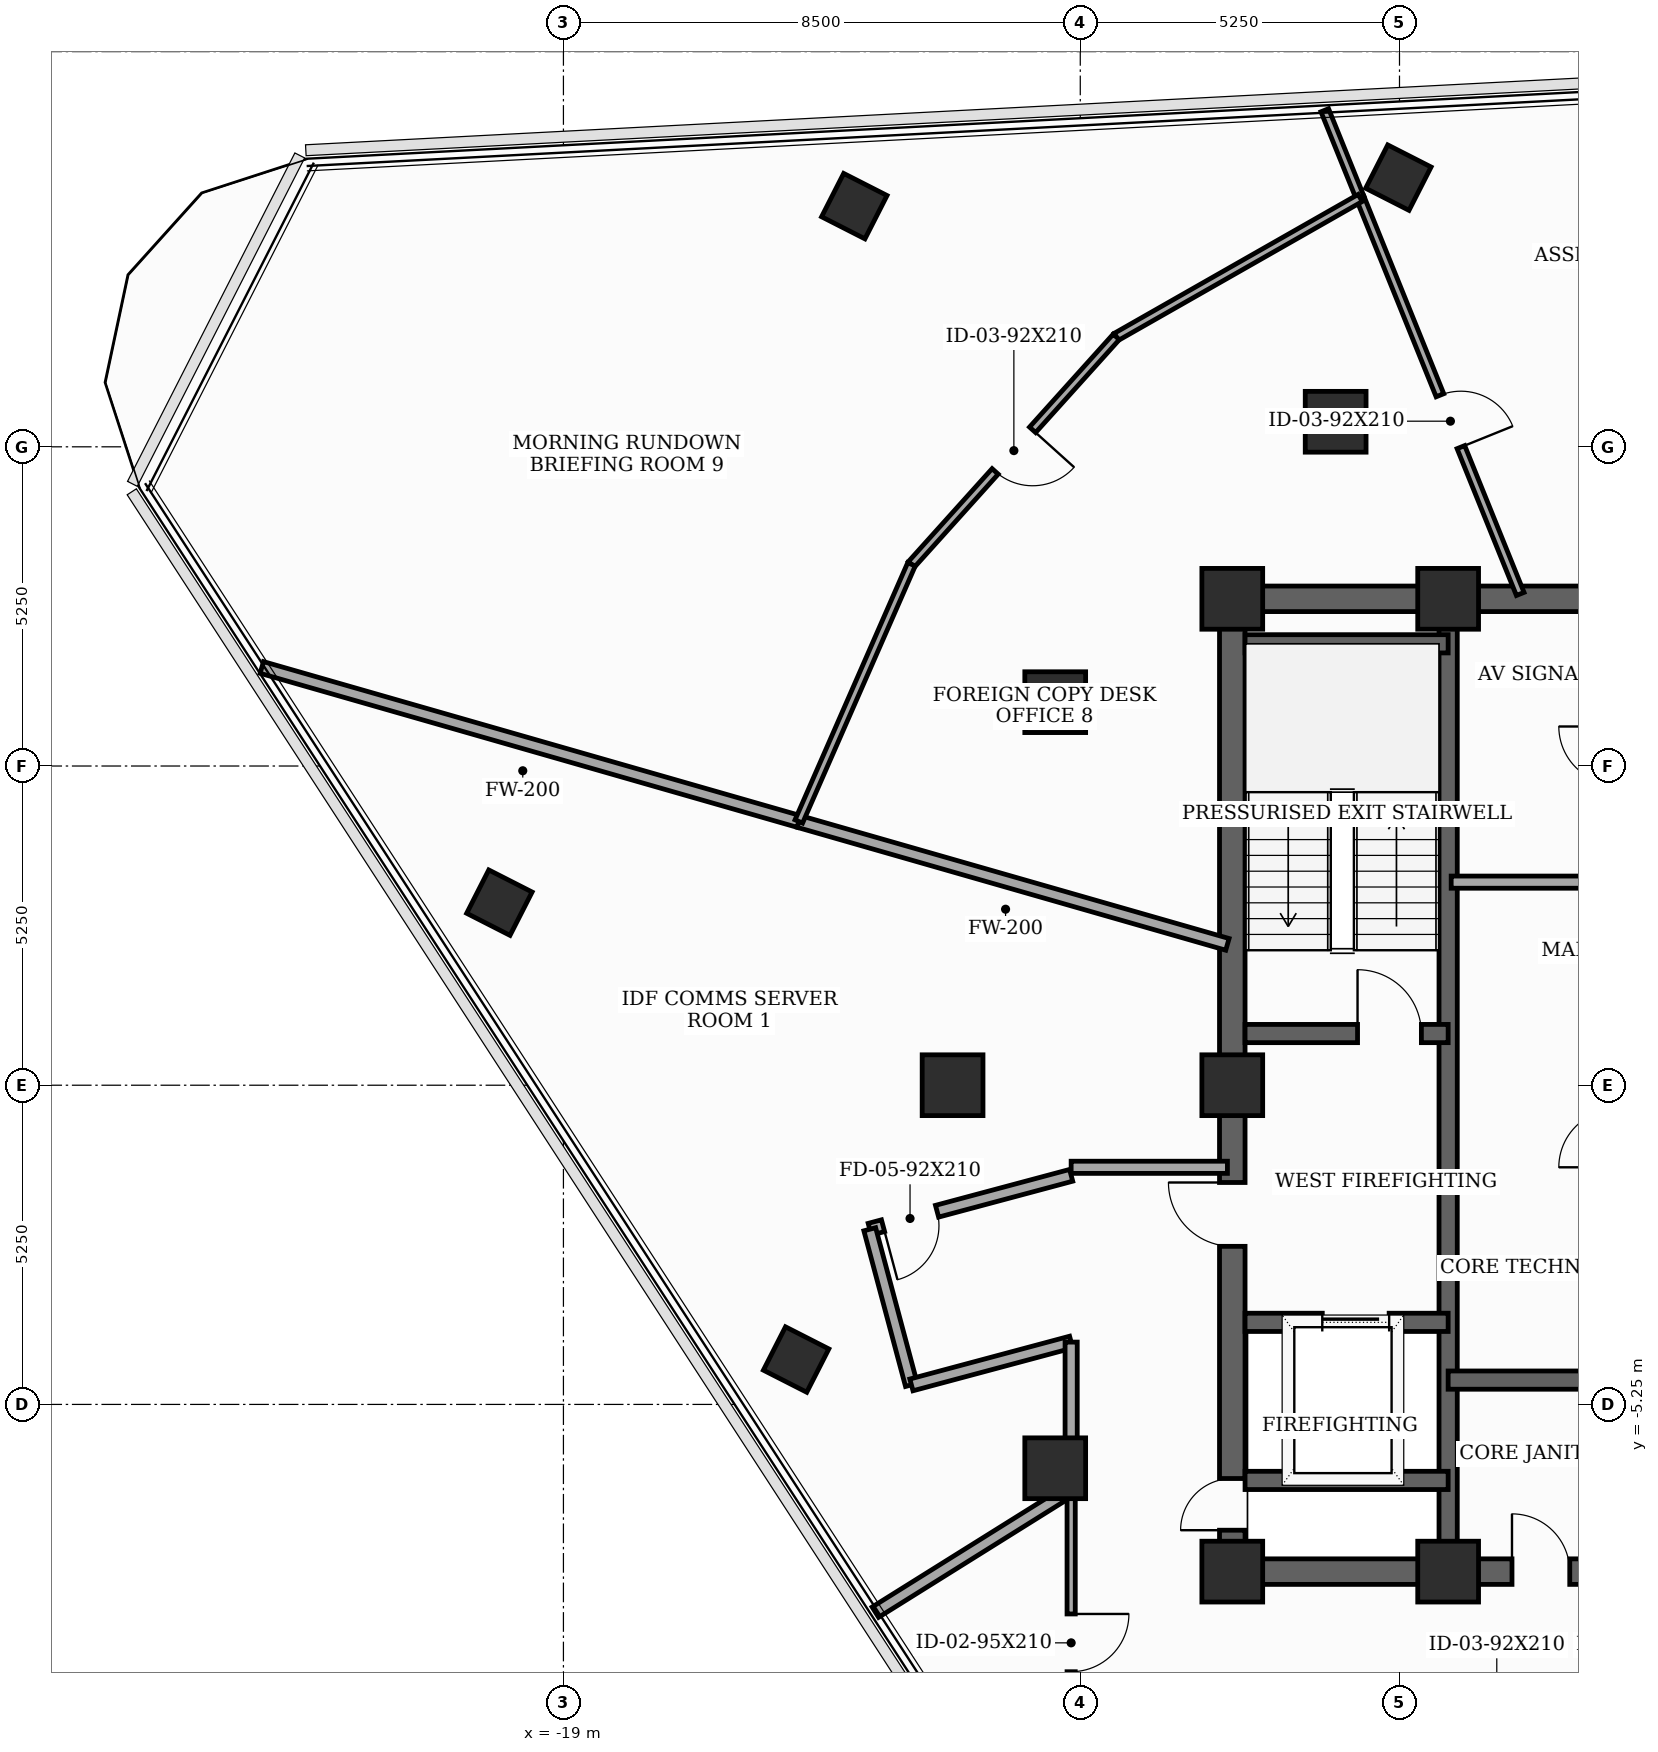
"""IFC4 building model, lengths in metres.
Left out: names, types, materials, properties, quantities, classifications, styles, units other than length and angle.
Written with IfcOpenShell. Run it as: python <this file> out.ifc"""

import sys

from ifc_helpers import new_model, si_unit, direction, frame, frame_2d, origin, origin_2d, place, context, subcontext, project, spatial, rectangle, extrude, element, fill, save


model = new_model("IFC4")
c1 = context("Model", 3, precision=1e-05, world=origin(), true_north=direction((0.0, 1.0)))
c2 = subcontext(c1, "Body", "Model", "MODEL_VIEW")
j1 = project(units=[si_unit("LENGTHUNIT", "METRE"), si_unit("PLANEANGLEUNIT", "RADIAN")], contexts=[c1])
p1 = place(None, origin())
s1 = spatial("IfcSite", under=j1, at=p1, CompositionType="ELEMENT")
p2 = place(p1, origin())
s2 = spatial("IfcBuilding", under=s1, at=p2, CompositionType="ELEMENT")
p3 = place(p2, frame((0.0, 0.0, 263.3)))
s3 = spatial("IfcBuildingStorey", under=s2, at=p3, CompositionType="ELEMENT", Elevation=263.3)
for number, where, z_axis, x_axis in (
    (1, (-8.0, -8.0, 0.0), (0.0, 0.0, 1.0), (1.0, 0.0, 0.0)),
    (2, (-4.45, -8.0, 0.0), (0.0, 0.0, 1.0), (1.0, 0.0, 0.0)),
    (3, (-4.45, 8.0, 0.0), (0.0, 0.0, 1.0), (1.0, 0.0, 0.0)),
    (4, (-8.0, 8.0, 0.0), (0.0, 0.0, 1.0), (1.0, 0.0, 0.0)),
    (5, (-8.0, 0.0, 0.0), (0.0, 0.0, 1.0), (1.0, 0.0, 0.0)),
    (6, (-6.3, 10.912, 0.0), (0.0, 0.0, 1.0), (1.0, 0.0, 0.0)),
    (7, (-10.912, 6.3, 0.0), (0.0, 0.0, 1.0), (1.0, 0.0, 0.0)),
    (8, (-12.6, 0.0, 0.0), (0.0, 0.0, 1.0), (1.0, 0.0, 0.0)),
    (9, (-10.912, -6.3, 0.0), (0.0, 0.0, 1.0), (1.0, 0.0, 0.0)),
):
    element("IfcColumn", number, at=place(p3, frame(where, z_axis=z_axis, x_axis=x_axis)), inside=s3, PredefinedType="COLUMN", context=c2, shape_type="SweptSolid", body=[
        extrude(rectangle(XDim=1.0, YDim=1.0, at=origin_2d()), origin(), (0.0, 0.0, 1.0), 3.7),
    ])
for number, where, z_axis, x_axis in (
    (10, (-5.269, 14.927, 0.0), (0.0, 0.0, 1.0), (0.454, 0.891, 0.0)),
    (11, (-14.216, 14.458, 0.0), (0.0, 0.0, 1.0), (0.454, 0.891, 0.0)),
    (12, (-20.053, 3.003, 0.0), (0.0, 0.0, 1.0), (0.454, 0.891, 0.0)),
    (13, (-15.173, -4.512, 0.0), (0.0, 0.0, 1.0), (0.454, 0.891, 0.0)),
):
    element("IfcColumn", number, at=place(p3, frame(where, z_axis=z_axis, x_axis=x_axis)), inside=s3, PredefinedType="COLUMN", context=c2, shape_type="SweptSolid", body=[
        extrude(rectangle(XDim=0.8, YDim=0.8, at=origin_2d()), origin(), (0.0, 0.0, 1.0), 3.7),
    ])
p4 = place(p3, frame((-8.0, -8.0, 0.0), z_axis=(0.0, 0.0, 1.0), x_axis=(0.0, 1.0, 0.0)))
e14 = element("IfcWall", 14, at=p4, inside=s3, PredefinedType="SHEAR", context=c2, shape_type="SweptSolid", body=[
    extrude(rectangle(XDim=16.0, YDim=0.42, at=frame_2d((8.0, 0.0))), origin(), (0.0, 0.0, 1.0), 3.5),
])
p5 = place(p4, frame((0.681, 0.0, 0.0)))
e15 = element("IfcOpeningElement", 15, at=p5, cuts=e14, PredefinedType="OPENING", context=c2, shape_type="SweptSolid", body=[
    extrude(rectangle(XDim=0.85, YDim=2.02, at=frame_2d((0.425, 1.01))), frame((0.0, 0.22, 0.0), z_axis=(0.0, -1.0, 0.0), x_axis=(1.0, 0.0, 0.0)), (0.0, 0.0, 1.0), 0.44),
])
p6 = place(p4, frame((5.35, 0.0, 0.0)))
e16 = element("IfcOpeningElement", 16, at=p6, cuts=e14, PredefinedType="OPENING", context=c2, shape_type="SweptSolid", body=[
    extrude(rectangle(XDim=1.05, YDim=2.15, at=frame_2d((0.525, 1.075))), frame((0.0, 0.22, 0.0), z_axis=(0.0, -1.0, 0.0), x_axis=(1.0, 0.0, 0.0)), (0.0, 0.0, 1.0), 0.44),
])
p7 = place(p3, frame((-8.0, -8.0, 0.0), z_axis=(0.0, 0.0, 1.0), x_axis=(1.0, 0.0, 0.0)))
e17 = element("IfcWall", 17, at=p7, inside=s3, PredefinedType="SHEAR", context=c2, shape_type="SweptSolid", body=[
    extrude(rectangle(XDim=16.0, YDim=0.42, at=frame_2d((8.0, 0.0))), origin(), (0.0, 0.0, 1.0), 3.5),
])
p8 = place(p7, frame((4.6, 0.0, 0.0)))
e18 = element("IfcOpeningElement", 18, at=p8, cuts=e17, PredefinedType="OPENING", context=c2, shape_type="SweptSolid", body=[
    extrude(rectangle(XDim=0.95, YDim=2.1, at=frame_2d((0.475, 1.05))), frame((0.0, 0.22, 0.0), z_axis=(0.0, -1.0, 0.0), x_axis=(1.0, 0.0, 0.0)), (0.0, 0.0, 1.0), 0.44),
])
p9 = place(p7, frame((7.52, 0.0, 0.0)))
e19 = element("IfcOpeningElement", 19, at=p9, cuts=e17, PredefinedType="OPENING", context=c2, shape_type="SweptSolid", body=[
    extrude(rectangle(XDim=0.95, YDim=2.1, at=frame_2d((0.475, 1.05))), frame((0.0, 0.22, 0.0), z_axis=(0.0, -1.0, 0.0), x_axis=(1.0, 0.0, 0.0)), (0.0, 0.0, 1.0), 0.44),
])
p10 = place(p7, frame((10.45, 0.0, 0.0)))
e20 = element("IfcOpeningElement", 20, at=p10, cuts=e17, PredefinedType="OPENING", context=c2, shape_type="SweptSolid", body=[
    extrude(rectangle(XDim=0.95, YDim=2.1, at=frame_2d((0.475, 1.05))), frame((0.0, 0.22, 0.0), z_axis=(0.0, -1.0, 0.0), x_axis=(1.0, 0.0, 0.0)), (0.0, 0.0, 1.0), 0.44),
])
p11 = place(p3, frame((-8.0, 8.0, 0.0), z_axis=(0.0, 0.0, 1.0), x_axis=(1.0, 0.0, 0.0)))
e21 = element("IfcWall", 21, at=p11, inside=s3, PredefinedType="SHEAR", context=c2, shape_type="SweptSolid", body=[
    extrude(rectangle(XDim=16.0, YDim=0.42, at=frame_2d((8.0, 0.0))), origin(), (0.0, 0.0, 1.0), 3.5),
])
p12 = place(p11, frame((7.1, 0.0, 0.0)))
e22 = element("IfcOpeningElement", 22, at=p12, cuts=e21, PredefinedType="OPENING", context=c2, shape_type="SweptSolid", body=[
    extrude(rectangle(XDim=1.8, YDim=2.15, at=frame_2d((0.9, 1.075))), frame((0.0, 0.22, 0.0), z_axis=(0.0, -1.0, 0.0), x_axis=(1.0, 0.0, 0.0)), (0.0, 0.0, 1.0), 0.44),
])
p13 = place(p3, frame((-4.45, -7.79, 0.0), z_axis=(0.0, 0.0, 1.0), x_axis=(0.0, 1.0, 0.0)))
e23 = element("IfcWall", 23, at=p13, inside=s3, PredefinedType="SHEAR", context=c2, shape_type="SweptSolid", body=[
    extrude(rectangle(XDim=15.58, YDim=0.3, at=frame_2d((7.79, 0.0))), origin(), (0.0, 0.0, 1.0), 3.5),
])
p14 = place(p3, frame((-7.79, 0.85, 0.0), z_axis=(0.0, 0.0, 1.0), x_axis=(1.0, 0.0, 0.0)))
e24 = element("IfcWall", 24, at=p14, inside=s3, PredefinedType="SHEAR", context=c2, shape_type="SweptSolid", body=[
    extrude(rectangle(XDim=3.34, YDim=0.3, at=frame_2d((1.67, 0.0))), origin(), (0.0, 0.0, 1.0), 3.5),
])
p15 = place(p14, frame((1.85, 0.0, 0.0)))
e25 = element("IfcOpeningElement", 25, at=p15, cuts=e24, PredefinedType="OPENING", context=c2, shape_type="SweptSolid", body=[
    extrude(rectangle(XDim=1.05, YDim=2.15, at=frame_2d((0.525, 1.075))), frame((0.0, 0.16, 0.0), z_axis=(0.0, -1.0, 0.0), x_axis=(1.0, 0.0, 0.0)), (0.0, 0.0, 1.0), 0.32),
])
p16 = place(p3, frame((-7.79, 7.26, 0.0), z_axis=(0.0, 0.0, 1.0), x_axis=(1.0, 0.0, 0.0)))
e26 = element("IfcWall", 26, at=p16, inside=s3, PredefinedType="SHEAR", context=c2, shape_type="SweptSolid", body=[
    extrude(rectangle(XDim=3.34, YDim=0.3, at=frame_2d((1.67, 0.0))), origin(), (0.0, 0.0, 1.0), 3.5),
])
p17 = place(p3, frame((-7.79, -3.9, 0.0), z_axis=(0.0, 0.0, 1.0), x_axis=(1.0, 0.0, 0.0)))
e27 = element("IfcWall", 27, at=p17, inside=s3, PredefinedType="SHEAR", context=c2, shape_type="SweptSolid", body=[
    extrude(rectangle(XDim=3.34, YDim=0.3, at=frame_2d((1.67, 0.0))), origin(), (0.0, 0.0, 1.0), 3.5),
])
p18 = place(p17, frame((1.27, 0.0, 0.0)))
e28 = element("IfcOpeningElement", 28, at=p18, cuts=e27, PredefinedType="OPENING", context=c2, shape_type="SweptSolid", body=[
    extrude(rectangle(XDim=1.1, YDim=2.1, at=frame_2d((0.55, 1.05))), frame((0.0, 0.16, 0.0), z_axis=(0.0, -1.0, 0.0), x_axis=(1.0, 0.0, 0.0)), (0.0, 0.0, 1.0), 0.32),
])
p19 = place(p3, frame((-7.79, -6.5, 0.0), z_axis=(0.0, 0.0, 1.0), x_axis=(1.0, 0.0, 0.0)))
e29 = element("IfcWall", 29, at=p19, inside=s3, PredefinedType="SHEAR", context=c2, shape_type="SweptSolid", body=[
    extrude(rectangle(XDim=3.34, YDim=0.3, at=frame_2d((1.67, 0.0))), origin(), (0.0, 0.0, 1.0), 3.5),
])
p20 = place(p3, frame((-4.45, -4.85, 0.0), z_axis=(0.0, 0.0, 1.0), x_axis=(1.0, 0.0, 0.0)))
e30 = element("IfcWall", 30, at=p20, inside=s3, PredefinedType="SHEAR", context=c2, shape_type="SweptSolid", body=[
    extrude(rectangle(XDim=8.9, YDim=0.3, at=frame_2d((4.45, 0.0))), origin(), (0.0, 0.0, 1.0), 3.5),
])
p21 = place(p3, frame((-4.4, 3.34, 0.0), z_axis=(0.0, 0.0, 1.0), x_axis=(1.0, 0.0, 0.0)))
e31 = element("IfcWall", 31, at=p21, inside=s3, PredefinedType="SOLIDWALL", context=c2, shape_type="SweptSolid", body=[
    extrude(rectangle(XDim=2.68, YDim=0.2, at=frame_2d((1.34, 0.0))), origin(), (0.0, 0.0, 1.0), 3.5),
])
p22 = place(p3, frame((-8.08, -1.35, 0.0), z_axis=(0.0, 0.0, 1.0), x_axis=(-1.0, 0.0, 0.0)))
e32 = element("IfcWall", 32, at=p22, inside=s3, PredefinedType="SOLIDWALL", context=c2, shape_type="SweptSolid", body=[
    extrude(rectangle(XDim=2.57, YDim=0.2, at=frame_2d((1.285, 0.0))), origin(), (0.0, 0.0, 1.0), 2.885),
])
p23 = place(p3, frame((-10.65, -1.482, 0.0), z_axis=(0.0, 0.0, 1.0), x_axis=(-0.965961397105, -0.2586862565, 0.0)))
e33 = element("IfcWall", 33, at=p23, inside=s3, PredefinedType="SOLIDWALL", context=c2, shape_type="SweptSolid", body=[
    extrude(rectangle(XDim=3.429, YDim=0.2, at=frame_2d((1.714, 0.0))), origin(), (0.0, 0.0, 1.0), 2.885),
])
p24 = place(p23, frame((2.283, 0.0, 0.0)))
e34 = element("IfcOpeningElement", 34, at=p24, cuts=e33, PredefinedType="OPENING", context=c2, shape_type="SweptSolid", body=[
    extrude(rectangle(XDim=0.92, YDim=2.1, at=frame_2d((0.46, 1.05))), frame((0.0, 0.11, 0.0), z_axis=(0.0, -1.0, 0.0), x_axis=(1.0, 0.0, 0.0)), (0.0, 0.0, 1.0), 0.22),
])
p25 = place(p3, frame((-13.962, -2.369, 0.0), z_axis=(0.0, 0.0, 1.0), x_axis=(0.258413725385, -0.966034340245, 0.0)))
e35 = element("IfcWall", 35, at=p25, inside=s3, PredefinedType="SOLIDWALL", context=c2, shape_type="SweptSolid", body=[
    extrude(rectangle(XDim=2.65, YDim=0.2, at=frame_2d((1.325, 0.0))), origin(), (0.0, 0.0, 1.0), 3.5),
])
p26 = place(p3, frame((-13.277, -4.929, 0.0), z_axis=(0.0, 0.0, 1.0), x_axis=(0.965934830229, 0.258785439601, 0.0)))
e36 = element("IfcWall", 36, at=p26, inside=s3, PredefinedType="SOLIDWALL", context=c2, shape_type="SweptSolid", body=[
    extrude(rectangle(XDim=2.72, YDim=0.2, at=frame_2d((1.36, 0.0))), origin(), (0.0, 0.0, 1.0), 2.885),
])
p27 = place(p3, frame((-10.65, -4.225, 0.0), z_axis=(0.0, 0.0, 1.0), x_axis=(0.0, -1.0, 0.0)))
e37 = element("IfcWall", 37, at=p27, inside=s3, PredefinedType="SOLIDWALL", context=c2, shape_type="SweptSolid", body=[
    extrude(rectangle(XDim=2.43, YDim=0.2, at=frame_2d((1.215, 0.0))), origin(), (0.0, 0.0, 1.0), 2.885),
])
p28 = place(p3, frame((-10.65, -6.655, 0.0), z_axis=(0.0, 0.0, 1.0), x_axis=(0.0, -1.0, 0.0)))
e38 = element("IfcWall", 38, at=p28, inside=s3, PredefinedType="PARTITIONING", context=c2, shape_type="SweptSolid", body=[
    extrude(rectangle(XDim=3.495, YDim=0.135, at=frame_2d((1.748, 0.0))), origin(), (0.0, 0.0, 1.0), 2.885),
])
p29 = place(p28, frame((2.042, 0.0, 0.0)))
e39 = element("IfcOpeningElement", 39, at=p29, cuts=e38, PredefinedType="OPENING", context=c2, shape_type="SweptSolid", body=[
    extrude(rectangle(XDim=0.95, YDim=2.1, at=frame_2d((0.475, 1.05))), frame((0.0, 0.077, 0.0), z_axis=(0.0, -1.0, 0.0), x_axis=(1.0, 0.0, 0.0)), (0.0, 0.0, 1.0), 0.155),
])
p30 = place(p3, frame((-13.87, -8.667, 0.0), z_axis=(0.0, 0.0, 1.0), x_axis=(0.848059708933, 0.529900679454, 0.0)))
e40 = element("IfcWall", 40, at=p30, inside=s3, PredefinedType="SOLIDWALL", context=c2, shape_type="SweptSolid", body=[
    extrude(rectangle(XDim=3.797, YDim=0.2, at=frame_2d((1.898, 0.0))), origin(), (0.0, 0.0, 1.0), 2.885),
])
p31 = place(p3, frame((-8.08, 2.317, 0.0), z_axis=(0.0, 0.0, 1.0), x_axis=(-0.961260926499, 0.275640039155, 0.0)))
e41 = element("IfcWall", 41, at=p31, inside=s3, PredefinedType="SOLIDWALL", context=c2, shape_type="SweptSolid", body=[
    extrude(rectangle(XDim=7.333, YDim=0.2, at=frame_2d((3.667, 0.0))), origin(), (0.0, 0.0, 1.0), 2.885),
])
p32 = place(p3, frame((-15.129, 4.338, 0.0), z_axis=(0.0, 0.0, 1.0), x_axis=(-0.96123865256, 0.275717704953, 0.0)))
e42 = element("IfcWall", 42, at=p32, inside=s3, PredefinedType="SOLIDWALL", context=c2, shape_type="SweptSolid", body=[
    extrude(rectangle(XDim=9.188, YDim=0.2, at=frame_2d((4.594, 0.0))), origin(), (0.0, 0.0, 1.0), 3.035),
])
p33 = place(p3, frame((-5.896, 14.593, 0.0), z_axis=(0.0, 0.0, 1.0), x_axis=(0.374630268076, -0.927174289032, 0.0)))
e43 = element("IfcWall", 43, at=p33, inside=s3, PredefinedType="PARTITIONING", context=c2, shape_type="SweptSolid", body=[
    extrude(rectangle(XDim=7.024, YDim=0.135, at=frame_2d((3.512, 0.0))), origin(), (0.0, 0.0, 1.0), 2.885),
])
p34 = place(p33, frame((3.5, 0.0, 0.0)))
e44 = element("IfcOpeningElement", 44, at=p34, cuts=e43, PredefinedType="OPENING", context=c2, shape_type="SweptSolid", body=[
    extrude(rectangle(XDim=0.92, YDim=2.1, at=frame_2d((0.46, 1.05))), frame((0.0, 0.077, 0.0), z_axis=(0.0, -1.0, 0.0), x_axis=(1.0, 0.0, 0.0)), (0.0, 0.0, 1.0), 0.155),
])
p35 = place(p3, frame((-6.479, 16.035, 0.0), z_axis=(0.0, 0.0, 1.0), x_axis=(0.374743256905, -0.927128627217, 0.0)))
e45 = element("IfcWall", 45, at=p35, inside=s3, PredefinedType="PARTITIONING", context=c2, shape_type="SweptSolid", body=[
    extrude(rectangle(XDim=1.556, YDim=0.135, at=frame_2d((0.778, 0.0))), origin(), (0.0, 0.0, 1.0), 3.035),
])
p36 = place(p3, frame((-5.896, 14.593, 0.0), z_axis=(0.0, 0.0, 1.0), x_axis=(-0.868954887981, -0.494891303877, 0.0)))
e46 = element("IfcWall", 46, at=p36, inside=s3, PredefinedType="PARTITIONING", context=c2, shape_type="SweptSolid", body=[
    extrude(rectangle(XDim=4.617, YDim=0.135, at=frame_2d((2.309, 0.0))), origin(), (0.0, 0.0, 1.0), 3.035),
])
p37 = place(p3, frame((-9.908, 12.308, 0.0), z_axis=(0.0, 0.0, 1.0), x_axis=(-0.669055831343, -0.743212146393, 0.0)))
e47 = element("IfcWall", 47, at=p37, inside=s3, PredefinedType="PARTITIONING", context=c2, shape_type="SweptSolid", body=[
    extrude(rectangle(XDim=5.034, YDim=0.135, at=frame_2d((2.517, 0.0))), origin(), (0.0, 0.0, 1.0), 3.035),
])
p38 = place(p37, frame((2.057, 0.0, 0.0)))
e48 = element("IfcOpeningElement", 48, at=p38, cuts=e47, PredefinedType="OPENING", context=c2, shape_type="SweptSolid", body=[
    extrude(rectangle(XDim=0.92, YDim=2.1, at=frame_2d((0.46, 1.05))), frame((0.0, 0.077, 0.0), z_axis=(0.0, -1.0, 0.0), x_axis=(1.0, 0.0, 0.0)), (0.0, 0.0, 1.0), 0.155),
])
p39 = place(p3, frame((-13.276, 8.567, 0.0), z_axis=(0.0, 0.0, 1.0), x_axis=(-0.401334709075, -0.915931466482, 0.0)))
e49 = element("IfcWall", 49, at=p39, inside=s3, PredefinedType="PARTITIONING", context=c2, shape_type="SweptSolid", body=[
    extrude(rectangle(XDim=4.617, YDim=0.135, at=frame_2d((2.309, 0.0))), origin(), (0.0, 0.0, 1.0), 3.185),
])
p40 = place(p5, origin())
e50 = element("IfcDoor", 50, at=p40, inside=s3, OperationType="SINGLE_SWING_LEFT", PredefinedType="TRAPDOOR", context=c2, shape_type="SweptSolid", body=[
    extrude(rectangle(XDim=0.85, YDim=2.02, at=frame_2d((0.425, 1.01))), frame((0.0, 0.025, 0.0), z_axis=(0.0, -1.0, 0.0), x_axis=(1.0, 0.0, 0.0)), (0.0, 0.0, 1.0), 0.05),
])
fill(e15, e50)
p41 = place(p6, origin())
e51 = element("IfcDoor", 51, at=p41, inside=s3, OperationType="SINGLE_SWING_RIGHT", PredefinedType="DOOR", context=c2, shape_type="SweptSolid", body=[
    extrude(rectangle(XDim=1.05, YDim=2.15, at=frame_2d((0.525, 1.075))), frame((0.0, 0.025, 0.0), z_axis=(0.0, -1.0, 0.0), x_axis=(1.0, 0.0, 0.0)), (0.0, 0.0, 1.0), 0.05),
])
fill(e16, e51)
p42 = place(p8, origin())
e52 = element("IfcDoor", 52, at=p42, inside=s3, OperationType="SINGLE_SWING_LEFT", PredefinedType="DOOR", context=c2, shape_type="SweptSolid", body=[
    extrude(rectangle(XDim=0.95, YDim=2.1, at=frame_2d((0.475, 1.05))), frame((0.0, 0.025, 0.0), z_axis=(0.0, -1.0, 0.0), x_axis=(1.0, 0.0, 0.0)), (0.0, 0.0, 1.0), 0.05),
])
fill(e18, e52)
p43 = place(p15, origin())
e53 = element("IfcDoor", 53, at=p43, inside=s3, OperationType="SINGLE_SWING_LEFT", PredefinedType="DOOR", context=c2, shape_type="SweptSolid", body=[
    extrude(rectangle(XDim=1.05, YDim=2.15, at=frame_2d((0.525, 1.075))), frame((0.0, 0.025, 0.0), z_axis=(0.0, -1.0, 0.0), x_axis=(1.0, 0.0, 0.0)), (0.0, 0.0, 1.0), 0.05),
])
fill(e25, e53)
p44 = place(p18, origin())
e54 = element("IfcDoor", 54, at=p44, inside=s3, OperationType="SLIDING_TO_LEFT", PredefinedType="DOOR", context=c2, shape_type="SweptSolid", body=[
    extrude(rectangle(XDim=1.1, YDim=2.1, at=frame_2d((0.55, 1.05))), frame((0.0, 0.025, 0.0), z_axis=(0.0, -1.0, 0.0), x_axis=(1.0, 0.0, 0.0)), (0.0, 0.0, 1.0), 0.05),
])
fill(e28, e54)
p45 = place(p24, origin())
e55 = element("IfcDoor", 55, at=p45, inside=s3, OperationType="SINGLE_SWING_RIGHT", PredefinedType="DOOR", context=c2, shape_type="SweptSolid", body=[
    extrude(rectangle(XDim=0.92, YDim=2.1, at=frame_2d((0.46, 1.05))), frame((0.0, 0.025, 0.0), z_axis=(0.0, -1.0, 0.0), x_axis=(1.0, 0.0, 0.0)), (0.0, 0.0, 1.0), 0.05),
])
fill(e34, e55)
p46 = place(p29, origin())
e56 = element("IfcDoor", 56, at=p46, inside=s3, OperationType="SINGLE_SWING_LEFT", PredefinedType="DOOR", context=c2, shape_type="SweptSolid", body=[
    extrude(rectangle(XDim=0.95, YDim=2.1, at=frame_2d((0.475, 1.05))), frame((0.0, 0.025, 0.0), z_axis=(0.0, -1.0, 0.0), x_axis=(1.0, 0.0, 0.0)), (0.0, 0.0, 1.0), 0.05),
])
fill(e39, e56)
p47 = place(p34, origin())
e57 = element("IfcDoor", 57, at=p47, inside=s3, OperationType="SINGLE_SWING_RIGHT", PredefinedType="DOOR", context=c2, shape_type="SweptSolid", body=[
    extrude(rectangle(XDim=0.92, YDim=2.1, at=frame_2d((0.46, 1.05))), frame((0.0, 0.025, 0.0), z_axis=(0.0, -1.0, 0.0), x_axis=(1.0, 0.0, 0.0)), (0.0, 0.0, 1.0), 0.05),
])
fill(e44, e57)
p48 = place(p38, origin())
e58 = element("IfcDoor", 58, at=p48, inside=s3, OperationType="SINGLE_SWING_LEFT", PredefinedType="DOOR", context=c2, shape_type="SweptSolid", body=[
    extrude(rectangle(XDim=0.92, YDim=2.1, at=frame_2d((0.46, 1.05))), frame((0.0, 0.025, 0.0), z_axis=(0.0, -1.0, 0.0), x_axis=(1.0, 0.0, 0.0)), (0.0, 0.0, 1.0), 0.05),
])
fill(e48, e58)
save(model, sys.argv[1])
